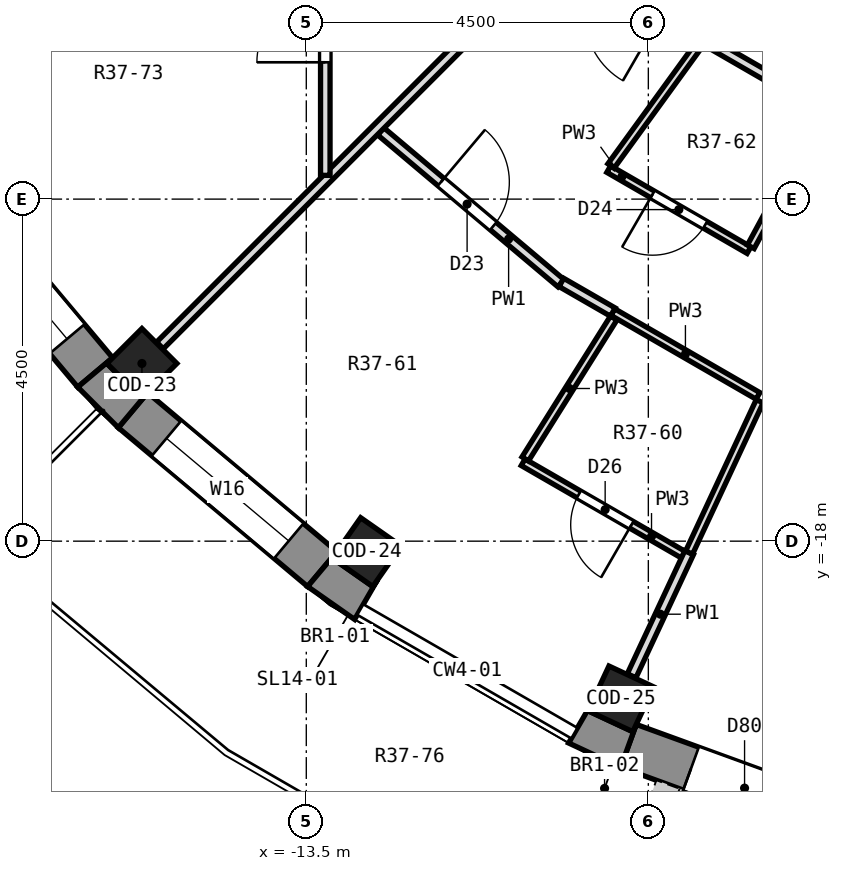
"""IFC4 building model, lengths in metres.
Left out: names, types, materials, properties, quantities, classifications, styles, units other than length and angle.
Written with IfcOpenShell. Run it as: python <this file> out.ifc"""

import sys

from ifc_helpers import new_model, si_unit, direction, frame, frame_2d, origin, origin_2d, place, context, subcontext, project, spatial, polyline, rectangle, outline, extrude, element, fill, save


model = new_model("IFC4")
c1 = context("Model", 3, precision=1e-05, world=origin(), true_north=direction((0.0, 1.0)))
c2 = subcontext(c1, "Body", "Model", "MODEL_VIEW")
j1 = project(units=[si_unit("LENGTHUNIT", "METRE"), si_unit("PLANEANGLEUNIT", "RADIAN")], contexts=[c1])
p1 = place(None, origin())
s1 = spatial("IfcSite", under=j1, at=p1, CompositionType="ELEMENT")
p2 = place(p1, origin())
s2 = spatial("IfcBuilding", under=s1, at=p2, CompositionType="ELEMENT")
p3 = place(p2, frame((0.0, 0.0, 269.3)))
s3 = spatial("IfcBuildingStorey", under=s2, at=p3, CompositionType="ELEMENT", Elevation=269.3)
for number, where, z_axis, x_axis in (
    (1, (-15.662, -15.662, 0.0), (0.0, 0.0, 1.0), (-0.707, -0.707, 0.0)),
    (2, (-12.705, -18.144, 0.0), (0.0, 0.0, 1.0), (-0.574, -0.819, 0.0)),
    (3, (-9.361, -20.075, 0.0), (0.0, 0.0, 1.0), (-0.423, -0.906, 0.0)),
):
    element("IfcColumn", number, at=place(p3, frame(where, z_axis=z_axis, x_axis=x_axis)), inside=s3, PredefinedType="COLUMN", context=c2, shape_type="SweptSolid", body=[
        extrude(rectangle(XDim=0.65, YDim=0.65, at=origin_2d()), origin(), (0.0, 0.0, 1.0), 3.3),
    ])
p4 = place(p3, frame((-18.367, -13.29, 0.0), z_axis=(0.0, 0.0, 1.0), x_axis=(0.64277291405, -0.766056773982, 0.0)))
e4 = element("IfcWall", 4, at=p4, inside=s3, PredefinedType="SOLIDWALL", context=c2, shape_type="SweptSolid", body=[
    extrude(rectangle(XDim=3.252, YDim=0.6, at=frame_2d((1.626, 0.0))), origin(), (0.0, 0.0, 1.0), 2.9),
])
p5 = place(p4, frame((0.576, 0.0, 0.9)))
e5 = element("IfcOpeningElement", 5, at=p5, cuts=e4, PredefinedType="OPENING", context=c2, shape_type="SweptSolid", body=[
    extrude(rectangle(XDim=2.1, YDim=1.8, at=frame_2d((1.05, 0.9))), frame((0.0, 0.312, 0.0), z_axis=(0.0, -1.0, 0.0), x_axis=(1.0, 0.0, 0.0)), (0.0, 0.0, 1.0), 0.624),
])
p6 = place(p3, frame((-15.781, -16.277, 0.0), z_axis=(0.0, 0.0, 1.0), x_axis=(0.766056773982, -0.64277291405, 0.0)))
e6 = element("IfcWall", 6, at=p6, inside=s3, PredefinedType="SOLIDWALL", context=c2, shape_type="SweptSolid", body=[
    extrude(rectangle(XDim=3.252, YDim=0.6, at=frame_2d((1.626, 0.0))), origin(), (0.0, 0.0, 1.0), 2.9),
])
p7 = place(p6, frame((0.576, 0.0, 0.9)))
e7 = element("IfcOpeningElement", 7, at=p7, cuts=e6, PredefinedType="OPENING", context=c2, shape_type="SweptSolid", body=[
    extrude(rectangle(XDim=2.1, YDim=1.8, at=frame_2d((1.05, 0.9))), frame((0.0, 0.312, 0.0), z_axis=(0.0, -1.0, 0.0), x_axis=(1.0, 0.0, 0.0)), (0.0, 0.0, 1.0), 0.624),
])
p8 = place(p3, frame((-9.262, -20.693, 0.0), z_axis=(0.0, 0.0, 1.0), x_axis=(0.939679383794, -0.342056509473, 0.0)))
e8 = element("IfcWall", 8, at=p8, inside=s3, PredefinedType="SOLIDWALL", context=c2, shape_type="SweptSolid", body=[
    extrude(rectangle(XDim=3.252, YDim=0.6, at=frame_2d((1.626, 0.0))), origin(), (0.0, 0.0, 1.0), 2.9),
])
p9 = place(p8, frame((0.876, 0.0, 0.0)))
e9 = element("IfcOpeningElement", 9, at=p9, cuts=e8, PredefinedType="OPENING", context=c2, shape_type="SweptSolid", body=[
    extrude(rectangle(XDim=1.5, YDim=2.4, at=frame_2d((0.75, 1.2))), frame((0.0, 0.312, 0.0), z_axis=(0.0, -1.0, 0.0), x_axis=(1.0, 0.0, 0.0)), (0.0, 0.0, 1.0), 0.624),
])
p10 = place(p3, origin())
e10 = element("IfcWall", 10, at=p10, inside=s3, PredefinedType="SOLIDWALL", context=c2, shape_type="SweptSolid", body=[
    extrude(outline(polyline([(-15.973, -16.507), (-15.588, -16.047), (-15.662, -16.122), (-16.122, -15.662), (-16.047, -15.588), (-16.507, -15.973), (-15.973, -16.507)])), origin(), (0.0, 0.0, 1.0), 2.9),
])
p11 = place(p3, origin())
e11 = element("IfcWall", 11, at=p11, inside=s3, PredefinedType="SOLIDWALL", context=c2, shape_type="SweptSolid", body=[
    extrude(outline(polyline([(-12.864, -19.03), (-12.564, -18.51), (-12.625, -18.597), (-13.157, -18.224), (-13.097, -18.137), (-13.482, -18.597), (-12.864, -19.03)])), origin(), (0.0, 0.0, 1.0), 2.9),
])
p12 = place(p3, origin())
e12 = element("IfcWall", 12, at=p12, inside=s3, PredefinedType="SOLIDWALL", context=c2, shape_type="SweptSolid", body=[
    extrude(outline(polyline([(-10.048, -20.656), (-9.364, -20.975), (-9.159, -20.411), (-9.204, -20.507), (-9.793, -20.232), (-9.748, -20.136), (-10.048, -20.656)])), origin(), (0.0, 0.0, 1.0), 2.9),
])
p13 = place(p3, frame((-12.521, -12.608, 0.0), z_axis=(0.0, 0.0, 1.0), x_axis=(0.764770295867, -0.644303030071, 0.0)))
e13 = element("IfcWall", 13, at=p13, inside=s3, PredefinedType="PARTITIONING", context=c2, shape_type="SweptSolid", body=[
    extrude(rectangle(XDim=3.101, YDim=0.125, at=frame_2d((1.55, 0.0))), origin(), (0.0, 0.0, 1.0), 2.9),
])
p14 = place(p13, frame((1.036, 0.0, 0.0)))
e14 = element("IfcOpeningElement", 14, at=p14, cuts=e13, PredefinedType="OPENING", context=c2, shape_type="SweptSolid", body=[
    extrude(rectangle(XDim=0.9, YDim=2.1, at=frame_2d((0.45, 1.05))), frame((0.0, 0.074, 0.0), z_axis=(0.0, -1.0, 0.0), x_axis=(1.0, 0.0, 0.0)), (0.0, 0.0, 1.0), 0.149),
])
p15 = place(p3, frame((-10.647, -16.962, 0.0), z_axis=(0.0, 0.0, 1.0), x_axis=(0.866072215893, -0.499918910283, 0.0)))
e15 = element("IfcWall", 15, at=p15, inside=s3, PredefinedType="PARTITIONING", context=c2, shape_type="SweptSolid", body=[
    extrude(rectangle(XDim=2.438, YDim=0.1, at=frame_2d((1.219, 0.0))), origin(), (0.0, 0.0, 1.0), 2.9),
])
p16 = place(p15, frame((0.846, 0.0, 0.0)))
e16 = element("IfcOpeningElement", 16, at=p16, cuts=e15, PredefinedType="OPENING", context=c2, shape_type="SweptSolid", body=[
    extrude(rectangle(XDim=0.8, YDim=2.1, at=frame_2d((0.4, 1.05))), frame((0.0, 0.062, 0.0), z_axis=(0.0, -1.0, 0.0), x_axis=(1.0, 0.0, 0.0)), (0.0, 0.0, 1.0), 0.124),
])
p17 = place(p3, frame((-9.467, -14.986, 0.0), z_axis=(0.0, 0.0, 1.0), x_axis=(0.866006764117, -0.500032283461, 0.0)))
e17 = element("IfcWall", 17, at=p17, inside=s3, PredefinedType="PARTITIONING", context=c2, shape_type="SweptSolid", body=[
    extrude(rectangle(XDim=2.205, YDim=0.1, at=frame_2d((1.103, 0.0))), origin(), (0.0, 0.0, 1.0), 2.9),
])
p18 = place(p3, frame((-10.144, -14.596, 0.0), z_axis=(0.0, 0.0, 1.0), x_axis=(0.866487258755, -0.499199189117, 0.0)))
e18 = element("IfcWall", 18, at=p18, inside=s3, PredefinedType="PARTITIONING", context=c2, shape_type="SweptSolid", body=[
    extrude(rectangle(XDim=0.781, YDim=0.125, at=frame_2d((0.391, 0.0))), origin(), (0.0, 0.0, 1.0), 2.9),
])
p19 = place(p3, frame((-9.521, -13.105, 0.0), z_axis=(0.0, 0.0, 1.0), x_axis=(0.865878308353, -0.500254690257, 0.0)))
e19 = element("IfcWall", 19, at=p19, inside=s3, PredefinedType="PARTITIONING", context=c2, shape_type="SweptSolid", body=[
    extrude(rectangle(XDim=2.131, YDim=0.1, at=frame_2d((1.065, 0.0))), origin(), (0.0, 0.0, 1.0), 2.9),
])
p20 = place(p19, frame((0.665, 0.0, 0.0)))
e20 = element("IfcOpeningElement", 20, at=p20, cuts=e19, PredefinedType="OPENING", context=c2, shape_type="SweptSolid", body=[
    extrude(rectangle(XDim=0.8, YDim=2.1, at=frame_2d((0.4, 1.05))), frame((0.0, 0.062, 0.0), z_axis=(0.0, -1.0, 0.0), x_axis=(1.0, 0.0, 0.0)), (0.0, 0.0, 1.0), 0.124),
])
p21 = place(p3, frame((-10.256, -10.256, 0.0), z_axis=(0.0, 0.0, 1.0), x_axis=(0.866032740159, -0.499987292811, 0.0)))
e21 = element("IfcWall", 21, at=p21, inside=s3, PredefinedType="PARTITIONING", context=c2, shape_type="SweptSolid", body=[
    extrude(rectangle(XDim=7.581, YDim=0.125, at=frame_2d((3.791, 0.0))), origin(), (0.0, 0.0, 1.0), 2.9),
])
p22 = place(p21, frame((0.641, 0.0, 0.0)))
e22 = element("IfcOpeningElement", 22, at=p22, cuts=e21, PredefinedType="OPENING", context=c2, shape_type="SweptSolid", body=[
    extrude(rectangle(XDim=1.0, YDim=2.1, at=frame_2d((0.5, 1.05))), frame((0.0, 0.074, 0.0), z_axis=(0.0, -1.0, 0.0), x_axis=(1.0, 0.0, 0.0)), (0.0, 0.0, 1.0), 0.149),
])
p23 = place(p3, frame((-8.426, -8.426, 0.0), z_axis=(0.0, 0.0, 1.0), x_axis=(0.866039004929, -0.499976441387, 0.0)))
e23 = element("IfcWall", 23, at=p23, inside=s3, PredefinedType="PARTITIONING", context=c2, shape_type="SweptSolid", body=[
    extrude(rectangle(XDim=6.24, YDim=0.125, at=frame_2d((3.12, 0.0))), origin(), (0.0, 0.0, 1.0), 2.9),
])
p24 = place(p23, frame((2.534, 0.0, 0.0)))
e24 = element("IfcOpeningElement", 24, at=p24, cuts=e23, PredefinedType="OPENING", context=c2, shape_type="SweptSolid", body=[
    extrude(rectangle(XDim=1.0, YDim=2.1, at=frame_2d((0.5, 1.05))), frame((0.0, 0.074, 0.0), z_axis=(0.0, -1.0, 0.0), x_axis=(1.0, 0.0, 0.0)), (0.0, 0.0, 1.0), 0.149),
])
p25 = place(p3, frame((-15.426, -15.426, 0.0), z_axis=(0.0, 0.0, 1.0), x_axis=(0.707106781187, 0.707106781187, 0.0)))
e25 = element("IfcWall", 25, at=p25, inside=s3, PredefinedType="PARTITIONING", context=c2, shape_type="SweptSolid", body=[
    extrude(rectangle(XDim=7.248, YDim=0.125, at=frame_2d((3.624, 0.0))), origin(), (0.0, 0.0, 1.0), 2.9),
])
p26 = place(p3, frame((-9.492, -13.064, 0.0), z_axis=(0.0, 0.0, 1.0), x_axis=(0.587873893167, 0.80895258559, 0.0)))
e26 = element("IfcWall", 26, at=p26, inside=s3, PredefinedType="PARTITIONING", context=c2, shape_type="SweptSolid", body=[
    extrude(rectangle(XDim=1.999, YDim=0.1, at=frame_2d((1.0, 0.0))), origin(), (0.0, 0.0, 1.0), 2.9),
])
p27 = place(p3, frame((-10.619, -16.918, 0.0), z_axis=(0.0, 0.0, 1.0), x_axis=(0.531622942945, 0.84698113706, 0.0)))
e27 = element("IfcWall", 27, at=p27, inside=s3, PredefinedType="PARTITIONING", context=c2, shape_type="SweptSolid", body=[
    extrude(rectangle(XDim=2.188, YDim=0.1, at=frame_2d((1.094, 0.0))), origin(), (0.0, 0.0, 1.0), 2.9),
])
p28 = place(p3, frame((-7.652, -14.127, 0.0), z_axis=(0.0, 0.0, 1.0), x_axis=(0.476243596433, 0.879313389444, 0.0)))
e28 = element("IfcWall", 28, at=p28, inside=s3, PredefinedType="PARTITIONING", context=c2, shape_type="SweptSolid", body=[
    extrude(rectangle(XDim=1.989, YDim=0.1, at=frame_2d((0.994, 0.0))), origin(), (0.0, 0.0, 1.0), 2.9),
])
p29 = place(p3, frame((-9.22, -19.771, 0.0), z_axis=(0.0, 0.0, 1.0), x_axis=(0.423191849194, 0.906040097775, 0.0)))
e29 = element("IfcWall", 29, at=p29, inside=s3, PredefinedType="PARTITIONING", context=c2, shape_type="SweptSolid", body=[
    extrude(rectangle(XDim=1.788, YDim=0.125, at=frame_2d((0.894, 0.0))), origin(), (0.0, 0.0, 1.0), 2.9),
])
p30 = place(p3, frame((-8.464, -18.15, 0.0), z_axis=(0.0, 0.0, 1.0), x_axis=(0.422599526454, 0.906316523208, 0.0)))
e30 = element("IfcWall", 30, at=p30, inside=s3, PredefinedType="PARTITIONING", context=c2, shape_type="SweptSolid", body=[
    extrude(rectangle(XDim=2.197, YDim=0.1, at=frame_2d((1.099, 0.0))), origin(), (0.0, 0.0, 1.0), 2.9),
])
p31 = place(p3, frame((-13.25, -13.188, 0.0), z_axis=(0.0, 0.0, 1.0), x_axis=(0.0, 1.0, 0.0)))
e31 = element("IfcWall", 31, at=p31, inside=s3, PredefinedType="PARTITIONING", context=c2, shape_type="SweptSolid", body=[
    extrude(rectangle(XDim=3.938, YDim=0.125, at=frame_2d((1.969, 0.0))), origin(), (0.0, 0.0, 1.0), 2.9),
])
p32 = place(p31, frame((1.488, 0.0, 0.0)))
e32 = element("IfcOpeningElement", 32, at=p32, cuts=e31, PredefinedType="OPENING", context=c2, shape_type="SweptSolid", body=[
    extrude(rectangle(XDim=0.9, YDim=2.1, at=frame_2d((0.45, 1.05))), frame((0.0, 0.074, 0.0), z_axis=(0.0, -1.0, 0.0), x_axis=(1.0, 0.0, 0.0)), (0.0, 0.0, 1.0), 0.149),
])
p33 = place(p5, origin())
e33 = element("IfcWindow", 33, at=p33, inside=s3, PartitioningType="SINGLE_PANEL", PredefinedType="WINDOW", context=c2, shape_type="SweptSolid", body=[
    extrude(rectangle(XDim=2.1, YDim=1.8, at=frame_2d((1.05, 0.9))), frame((0.0, 0.18, 0.0), z_axis=(0.0, -1.0, 0.0), x_axis=(1.0, 0.0, 0.0)), (0.0, 0.0, 1.0), 0.06),
])
fill(e5, e33)
p34 = place(p7, origin())
e34 = element("IfcWindow", 34, at=p34, inside=s3, PartitioningType="SINGLE_PANEL", PredefinedType="WINDOW", context=c2, shape_type="SweptSolid", body=[
    extrude(rectangle(XDim=2.1, YDim=1.8, at=frame_2d((1.05, 0.9))), frame((0.0, 0.18, 0.0), z_axis=(0.0, -1.0, 0.0), x_axis=(1.0, 0.0, 0.0)), (0.0, 0.0, 1.0), 0.06),
])
fill(e7, e34)
p35 = place(p9, frame((1.5, 0.0, 0.0), z_axis=(0.0, 0.0, 1.0), x_axis=(-1.0, 0.0, 0.0)))
e35 = element("IfcDoor", 35, at=p35, inside=s3, OperationType="DOUBLE_DOOR_SINGLE_SWING", PredefinedType="DOOR", context=c2, shape_type="SweptSolid", body=[
    extrude(rectangle(XDim=1.5, YDim=2.4, at=frame_2d((0.75, 1.2))), frame((0.0, -0.075, 0.0), z_axis=(0.0, -1.0, 0.0), x_axis=(1.0, 0.0, 0.0)), (0.0, 0.0, 1.0), 0.05),
])
fill(e9, e35)
p36 = place(p32, origin())
e36 = element("IfcDoor", 36, at=p36, inside=s3, OperationType="SINGLE_SWING_LEFT", PredefinedType="DOOR", context=c2, shape_type="SweptSolid", body=[
    extrude(rectangle(XDim=0.9, YDim=2.1, at=frame_2d((0.45, 1.05))), frame((0.0, 0.025, 0.0), z_axis=(0.0, -1.0, 0.0), x_axis=(1.0, 0.0, 0.0)), (0.0, 0.0, 1.0), 0.05),
])
fill(e32, e36)
p37 = place(p14, origin())
e37 = element("IfcDoor", 37, at=p37, inside=s3, OperationType="SINGLE_SWING_LEFT", PredefinedType="DOOR", context=c2, shape_type="SweptSolid", body=[
    extrude(rectangle(XDim=0.9, YDim=2.1, at=frame_2d((0.45, 1.05))), frame((0.0, 0.025, 0.0), z_axis=(0.0, -1.0, 0.0), x_axis=(1.0, 0.0, 0.0)), (0.0, 0.0, 1.0), 0.05),
])
fill(e14, e37)
p38 = place(p20, frame((0.8, 0.0, 0.0), z_axis=(0.0, 0.0, 1.0), x_axis=(-1.0, 0.0, 0.0)))
e38 = element("IfcDoor", 38, at=p38, inside=s3, OperationType="SINGLE_SWING_RIGHT", PredefinedType="DOOR", context=c2, shape_type="SweptSolid", body=[
    extrude(rectangle(XDim=0.8, YDim=2.1, at=frame_2d((0.4, 1.05))), frame((0.0, 0.025, 0.0), z_axis=(0.0, -1.0, 0.0), x_axis=(1.0, 0.0, 0.0)), (0.0, 0.0, 1.0), 0.05),
])
fill(e20, e38)
p39 = place(p16, frame((0.8, 0.0, 0.0), z_axis=(0.0, 0.0, 1.0), x_axis=(-1.0, 0.0, 0.0)))
e39 = element("IfcDoor", 39, at=p39, inside=s3, OperationType="SINGLE_SWING_LEFT", PredefinedType="DOOR", context=c2, shape_type="SweptSolid", body=[
    extrude(rectangle(XDim=0.8, YDim=2.1, at=frame_2d((0.4, 1.05))), frame((0.0, 0.025, 0.0), z_axis=(0.0, -1.0, 0.0), x_axis=(1.0, 0.0, 0.0)), (0.0, 0.0, 1.0), 0.05),
])
fill(e16, e39)
save(model, sys.argv[1])
